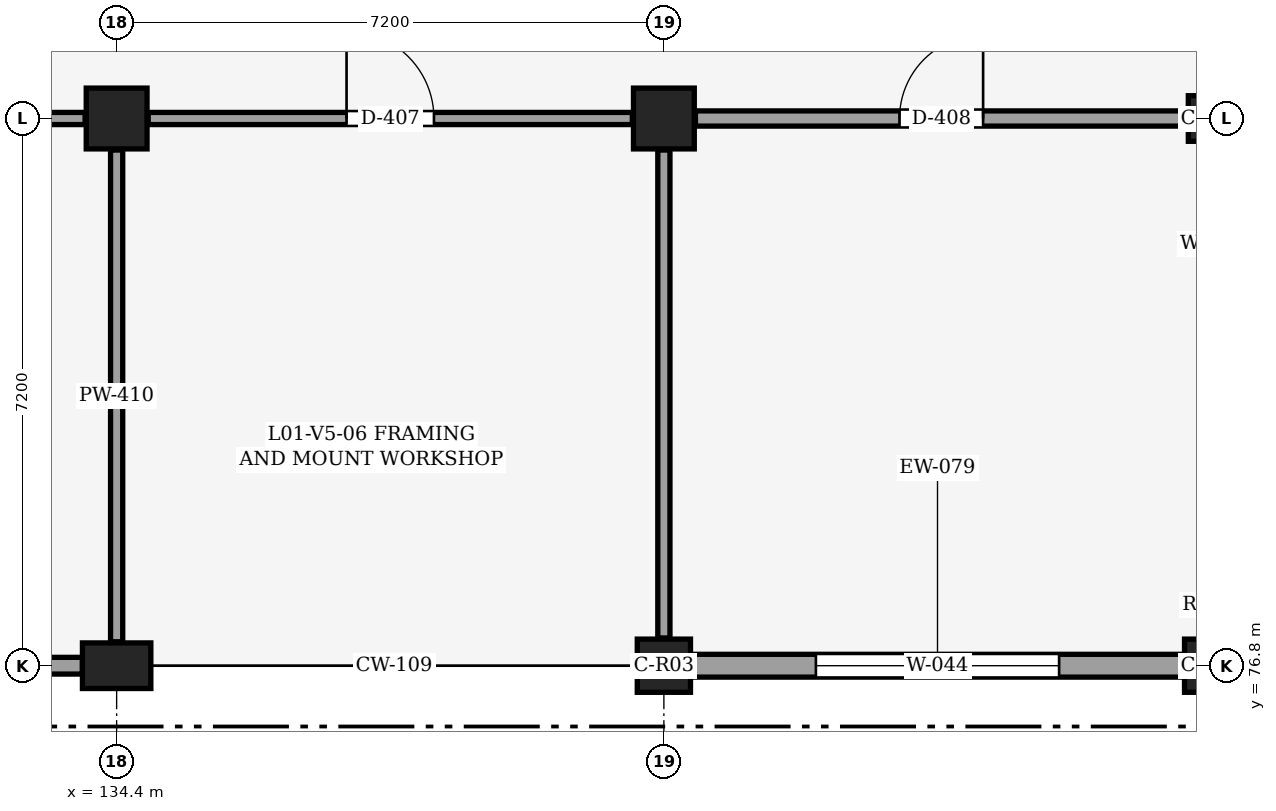
"""IFC4 building model, lengths in metres.
Left out: names, types, materials, properties, quantities, classifications, styles, units other than length and angle.
Written with IfcOpenShell. Run it as: python <this file> out.ifc"""

import sys

from ifc_helpers import new_model, si_unit, direction, frame, frame_2d, origin, origin_2d, place, context, subcontext, project, spatial, rectangle, extrude, element, fill, save


model = new_model("IFC4")
c1 = context("Model", 3, precision=1e-05, world=origin(), true_north=direction((0.0, 1.0)))
c2 = subcontext(c1, "Body", "Model", "MODEL_VIEW")
j1 = project(units=[si_unit("LENGTHUNIT", "METRE"), si_unit("PLANEANGLEUNIT", "RADIAN")], contexts=[c1])
p1 = place(None, origin())
s1 = spatial("IfcSite", under=j1, at=p1, CompositionType="ELEMENT")
p2 = place(p1, origin())
s2 = spatial("IfcBuilding", under=s1, at=p2, CompositionType="ELEMENT")
p3 = place(p2, frame((0.0, 0.0, 5.4)))
s3 = spatial("IfcBuildingStorey", under=s2, at=p3, CompositionType="ELEMENT", Elevation=5.4)
p4 = place(p3, frame((134.4, 76.8, 0.0), z_axis=(0.0, 0.0, 1.0), x_axis=(1.0, 0.0, 0.0)))
e1 = element("IfcColumn", 1, at=p4, inside=s3, PredefinedType="COLUMN", context=c2, shape_type="SweptSolid", body=[
    extrude(rectangle(XDim=0.9, YDim=0.6, at=origin_2d()), origin(), (0.0, 0.0, 1.0), 4.8),
])
p5 = place(p3, frame((134.4, 84.0, 0.0), z_axis=(0.0, 0.0, 1.0), x_axis=(1.0, 0.0, 0.0)))
e2 = element("IfcColumn", 2, at=p5, inside=s3, PredefinedType="COLUMN", context=c2, shape_type="SweptSolid", body=[
    extrude(rectangle(XDim=0.8, YDim=0.8, at=origin_2d()), origin(), (0.0, 0.0, 1.0), 4.8),
])
p6 = place(p3, frame((141.6, 76.8, 0.0), z_axis=(0.0, 0.0, 1.0), x_axis=(1.0, 0.0, 0.0)))
e3 = element("IfcColumn", 3, at=p6, inside=s3, PredefinedType="COLUMN", context=c2, shape_type="SweptSolid", body=[
    extrude(rectangle(XDim=0.7, YDim=0.7, at=origin_2d()), origin(), (0.0, 0.0, 1.0), 4.8),
])
p7 = place(p3, frame((141.6, 84.0, 0.0), z_axis=(0.0, 0.0, 1.0), x_axis=(1.0, 0.0, 0.0)))
e4 = element("IfcColumn", 4, at=p7, inside=s3, PredefinedType="COLUMN", context=c2, shape_type="SweptSolid", body=[
    extrude(rectangle(XDim=0.8, YDim=0.8, at=origin_2d()), origin(), (0.0, 0.0, 1.0), 4.8),
])
p8 = place(p3, frame((148.8, 76.8, 0.0), z_axis=(0.0, 0.0, 1.0), x_axis=(1.0, 0.0, 0.0)))
e5 = element("IfcColumn", 5, at=p8, inside=s3, PredefinedType="COLUMN", context=c2, shape_type="SweptSolid", body=[
    extrude(rectangle(XDim=0.7, YDim=0.7, at=origin_2d()), origin(), (0.0, 0.0, 1.0), 4.8),
])
p9 = place(p3, frame((148.8, 84.0, 0.0), z_axis=(0.0, 0.0, 1.0), x_axis=(1.0, 0.0, 0.0)))
e6 = element("IfcColumn", 6, at=p9, inside=s3, PredefinedType="COLUMN", context=c2, shape_type="SweptSolid", body=[
    extrude(rectangle(XDim=0.6, YDim=0.6, at=origin_2d()), origin(), (0.0, 0.0, 1.0), 4.8),
])
p10 = place(p3, frame((133.95, 76.8, 0.0), z_axis=(0.0, 0.0, 1.0), x_axis=(-1.0, 0.0, 0.0)))
e7 = element("IfcWall", 7, at=p10, inside=s3, PredefinedType="SOLIDWALL", context=c2, shape_type="SweptSolid", body=[
    extrude(rectangle(XDim=6.35, YDim=0.22, at=frame_2d((3.175, 0.0))), origin(), (0.0, 0.0, 1.0), 3.971),
])
p11 = place(p10, frame((1.775, 0.0, 0.9)))
e8 = element("IfcOpeningElement", 8, at=p11, cuts=e7, PredefinedType="OPENING", context=c2, shape_type="SweptSolid", body=[
    extrude(rectangle(XDim=2.8, YDim=0.9, at=frame_2d((1.4, 0.45))), frame((0.0, 0.12, 0.0), z_axis=(0.0, -1.0, 0.0), x_axis=(1.0, 0.0, 0.0)), (0.0, 0.0, 1.0), 0.24),
])
p12 = place(p3, frame((148.45, 76.8, 0.0), z_axis=(0.0, 0.0, 1.0), x_axis=(-1.0, 0.0, 0.0)))
e9 = element("IfcWall", 9, at=p12, inside=s3, PredefinedType="SOLIDWALL", context=c2, shape_type="SweptSolid", body=[
    extrude(rectangle(XDim=6.5, YDim=0.3, at=frame_2d((3.25, 0.0))), origin(), (0.0, 0.0, 1.0), 4.058),
])
p13 = place(p12, frame((1.65, 0.0, 0.9)))
e10 = element("IfcOpeningElement", 10, at=p13, cuts=e9, PredefinedType="OPENING", context=c2, shape_type="SweptSolid", body=[
    extrude(rectangle(XDim=3.2, YDim=1.05, at=frame_2d((1.6, 0.525))), frame((0.0, 0.16, 0.0), z_axis=(0.0, -1.0, 0.0), x_axis=(1.0, 0.0, 0.0)), (0.0, 0.0, 1.0), 0.321),
])
p14 = place(p3, frame((127.665, 84.0, 0.0), z_axis=(0.0, 0.0, 1.0), x_axis=(1.0, 0.0, 0.0)))
e11 = element("IfcWall", 11, at=p14, inside=s3, PredefinedType="PARTITIONING", context=c2, shape_type="SweptSolid", body=[
    extrude(rectangle(XDim=6.32, YDim=0.16, at=frame_2d((3.16, 0.0))), origin(), (0.0, 0.0, 1.0), 3.987),
])
p15 = place(p14, frame((2.36, 0.0, 0.0)))
e12 = element("IfcOpeningElement", 12, at=p15, cuts=e11, PredefinedType="OPENING", context=c2, shape_type="SweptSolid", body=[
    extrude(rectangle(XDim=1.6, YDim=2.35, at=frame_2d((0.8, 1.175))), frame((0.0, 0.09, 0.0), z_axis=(0.0, -1.0, 0.0), x_axis=(1.0, 0.0, 0.0)), (0.0, 0.0, 1.0), 0.18),
])
p16 = place(p3, frame((134.4, 77.115, 0.0), z_axis=(0.0, 0.0, 1.0), x_axis=(0.0, 1.0, 0.0)))
e13 = element("IfcWall", 13, at=p16, inside=s3, PredefinedType="PARTITIONING", context=c2, shape_type="SweptSolid", body=[
    extrude(rectangle(XDim=6.47, YDim=0.16, at=frame_2d((3.235, 0.0))), origin(), (0.0, 0.0, 1.0), 3.987),
])
p17 = place(p3, frame((134.815, 84.0, 0.0), z_axis=(0.0, 0.0, 1.0), x_axis=(1.0, 0.0, 0.0)))
e14 = element("IfcWall", 14, at=p17, inside=s3, PredefinedType="PARTITIONING", context=c2, shape_type="SweptSolid", body=[
    extrude(rectangle(XDim=6.37, YDim=0.16, at=frame_2d((3.185, 0.0))), origin(), (0.0, 0.0, 1.0), 4.058),
])
p18 = place(p17, frame((2.61, 0.0, 0.0)))
e15 = element("IfcOpeningElement", 15, at=p18, cuts=e14, PredefinedType="OPENING", context=c2, shape_type="SweptSolid", body=[
    extrude(rectangle(XDim=1.15, YDim=2.2, at=frame_2d((0.575, 1.1))), frame((0.0, 0.09, 0.0), z_axis=(0.0, -1.0, 0.0), x_axis=(1.0, 0.0, 0.0)), (0.0, 0.0, 1.0), 0.18),
])
p19 = place(p3, frame((141.6, 77.165, 0.0), z_axis=(0.0, 0.0, 1.0), x_axis=(0.0, 1.0, 0.0)))
e16 = element("IfcWall", 16, at=p19, inside=s3, PredefinedType="PARTITIONING", context=c2, shape_type="SweptSolid", body=[
    extrude(rectangle(XDim=6.42, YDim=0.16, at=frame_2d((3.21, 0.0))), origin(), (0.0, 0.0, 1.0), 4.058),
])
p20 = place(p3, frame((142.015, 84.0, 0.0), z_axis=(0.0, 0.0, 1.0), x_axis=(1.0, 0.0, 0.0)))
e17 = element("IfcWall", 17, at=p20, inside=s3, PredefinedType="PARTITIONING", context=c2, shape_type="SweptSolid", body=[
    extrude(rectangle(XDim=6.47, YDim=0.2, at=frame_2d((3.235, 0.0))), origin(), (0.0, 0.0, 1.0), 3.913),
])
p21 = place(p20, frame((2.685, 0.0, 0.0)))
e18 = element("IfcOpeningElement", 18, at=p21, cuts=e17, PredefinedType="OPENING", context=c2, shape_type="SweptSolid", body=[
    extrude(rectangle(XDim=1.1, YDim=2.15, at=frame_2d((0.55, 1.075))), frame((0.0, 0.11, 0.0), z_axis=(0.0, -1.0, 0.0), x_axis=(1.0, 0.0, 0.0)), (0.0, 0.0, 1.0), 0.22),
])
p22 = place(p13, origin())
e19 = element("IfcWindow", 19, at=p22, inside=s3, PartitioningType="SINGLE_PANEL", PredefinedType="WINDOW", context=c2, shape_type="SweptSolid", body=[
    extrude(rectangle(XDim=3.2, YDim=1.05, at=frame_2d((1.6, 0.525))), frame((0.0, 0.03, 0.0), z_axis=(0.0, -1.0, 0.0), x_axis=(1.0, 0.0, 0.0)), (0.0, 0.0, 1.0), 0.06),
])
fill(e10, e19)
p23 = place(p18, origin())
e20 = element("IfcDoor", 20, at=p23, inside=s3, OperationType="SINGLE_SWING_LEFT", PredefinedType="DOOR", context=c2, shape_type="SweptSolid", body=[
    extrude(rectangle(XDim=1.15, YDim=2.2, at=frame_2d((0.575, 1.1))), frame((0.0, 0.025, 0.0), z_axis=(0.0, -1.0, 0.0), x_axis=(1.0, 0.0, 0.0)), (0.0, 0.0, 1.0), 0.05),
])
fill(e15, e20)
p24 = place(p21, origin())
e21 = element("IfcDoor", 21, at=p24, inside=s3, OperationType="SINGLE_SWING_RIGHT", PredefinedType="DOOR", context=c2, shape_type="SweptSolid", body=[
    extrude(rectangle(XDim=1.1, YDim=2.15, at=frame_2d((0.55, 1.075))), frame((0.0, 0.025, 0.0), z_axis=(0.0, -1.0, 0.0), x_axis=(1.0, 0.0, 0.0)), (0.0, 0.0, 1.0), 0.05),
])
fill(e18, e21)
save(model, sys.argv[1])
